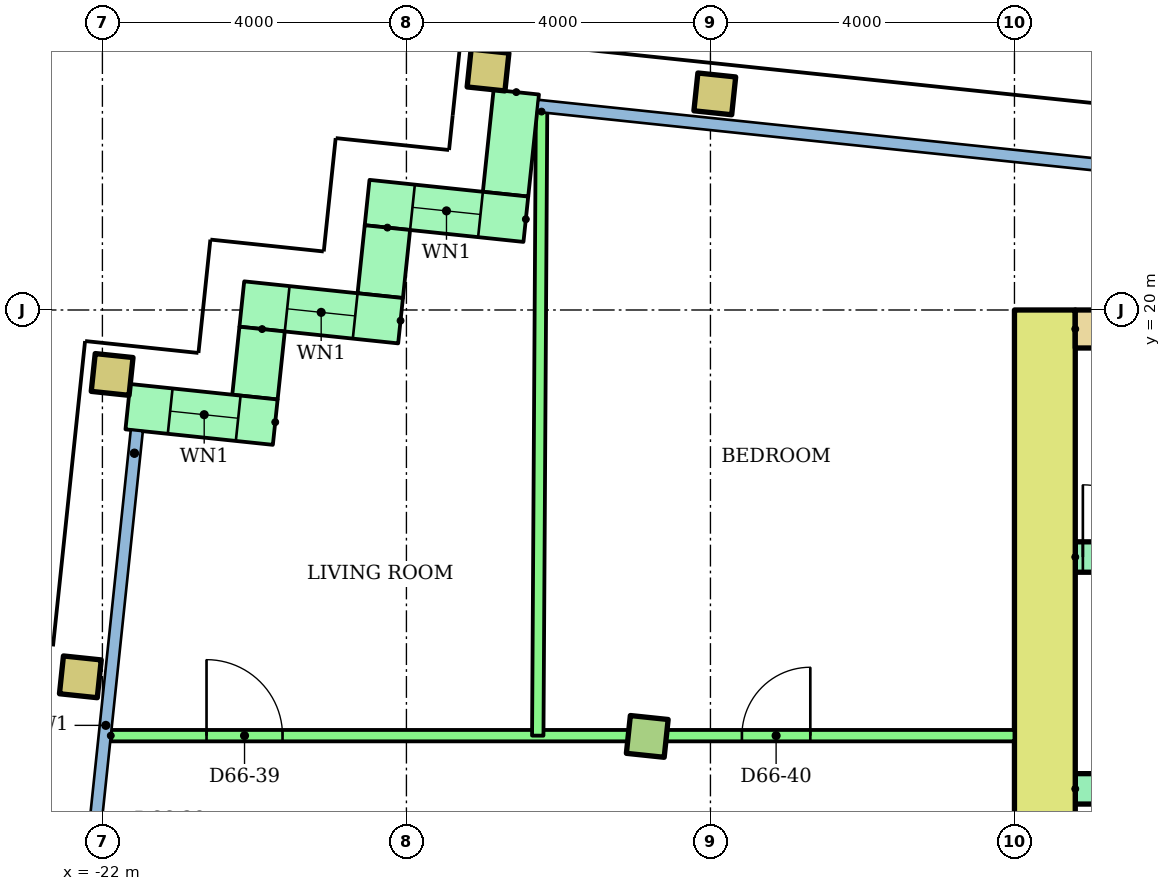
"""IFC4 building model, lengths in metres.
Left out: names, types, materials, properties, quantities, classifications, styles, units other than length and angle.
Written with IfcOpenShell. Run it as: python <this file> out.ifc"""

import sys

from ifc_helpers import new_model, si_unit, direction, frame, frame_2d, origin, origin_2d, place, context, subcontext, project, spatial, rectangle, hollow_rectangle, extrude, element, fill, save


model = new_model("IFC4")
c1 = context("Model", 3, precision=1e-05, world=origin(), true_north=direction((0.0, 1.0)))
c2 = subcontext(c1, "Body", "Model", "MODEL_VIEW")
j1 = project(units=[si_unit("LENGTHUNIT", "METRE"), si_unit("PLANEANGLEUNIT", "RADIAN")], contexts=[c1])
p1 = place(None, origin())
s1 = spatial("IfcSite", under=j1, at=p1, CompositionType="ELEMENT")
p2 = place(p1, origin())
s2 = spatial("IfcBuilding", under=s1, at=p2, CompositionType="ELEMENT")
p3 = place(p2, frame((0.0, 0.0, 256.3)))
s3 = spatial("IfcBuildingStorey", under=s2, at=p3, CompositionType="ELEMENT", Elevation=256.3)
p4 = place(p3, frame((-22.29, 15.174, 0.0), z_axis=(0.0, 0.0, 1.0), x_axis=(0.994521895368, -0.104528463268, 0.0)))
e1 = element("IfcColumn", 1, at=p4, inside=s3, PredefinedType="COLUMN", context=c2, shape_type="SweptSolid", body=[
    extrude(hollow_rectangle(XDim=0.5, YDim=0.5, WallThickness=0.025, at=origin_2d()), origin(), (0.0, 0.0, 1.0), 3.2),
])
p5 = place(p3, frame((-14.831, 14.39, 0.0), z_axis=(0.0, 0.0, 1.0), x_axis=(0.994521895368, -0.104528463268, 0.0)))
e2 = element("IfcColumn", 2, at=p5, inside=s3, PredefinedType="COLUMN", context=c2, shape_type="SweptSolid", body=[
    extrude(rectangle(XDim=0.5, YDim=0.5, at=origin_2d()), origin(), (0.0, 0.0, 1.0), 3.2),
])
for number, where, z_axis, x_axis in (
    (3, (-21.872, 19.152, 0.0), (0.0, 0.0, 1.0), (0.995, -0.105, 0.0)),
    (4, (-16.926, 23.157, 0.0), (0.0, 0.0, 1.0), (0.995, -0.105, 0.0)),
    (5, (-13.943, 22.843, 0.0), (0.0, 0.0, 1.0), (0.995, -0.105, 0.0)),
):
    element("IfcColumn", number, at=place(p3, frame(where, z_axis=z_axis, x_axis=x_axis)), inside=s3, PredefinedType="COLUMN", context=c2, shape_type="SweptSolid", body=[
        extrude(hollow_rectangle(XDim=0.5, YDim=0.5, WallThickness=0.025, at=origin_2d()), origin(), (0.0, 0.0, 1.0), 3.2),
    ])
p6 = place(p3, frame((-16.555, 22.866, 0.0), z_axis=(0.0, 0.0, 1.0), x_axis=(-0.104515354875, -0.994523273029, 0.0)))
e6 = element("IfcWall", 6, at=p6, inside=s3, PredefinedType="STANDARD", context=c2, shape_type="SweptSolid", body=[
    extrude(rectangle(XDim=1.35, YDim=0.6, at=frame_2d((0.675, 0.0))), origin(), (0.0, 0.0, 1.0), 2.92),
])
p7 = place(p3, frame((-16.429, 21.194, 0.0), z_axis=(0.0, 0.0, 1.0), x_axis=(-0.994522640205, 0.104521376379, 0.0)))
e7 = element("IfcWall", 7, at=p7, inside=s3, PredefinedType="STANDARD", context=c2, shape_type="SweptSolid", body=[
    extrude(rectangle(XDim=2.1, YDim=0.6, at=frame_2d((1.05, 0.0))), origin(), (0.0, 0.0, 1.0), 2.92),
])
p8 = place(p7, frame((0.6, 0.0, 0.9)))
e8 = element("IfcOpeningElement", 8, at=p8, cuts=e7, PredefinedType="OPENING", context=c2, shape_type="SweptSolid", body=[
    extrude(rectangle(XDim=0.9, YDim=1.5, at=frame_2d((0.45, 0.75))), frame((0.0, 0.31, 0.0), z_axis=(0.0, -1.0, 0.0), x_axis=(1.0, 0.0, 0.0)), (0.0, 0.0, 1.0), 0.62),
])
p9 = place(p3, frame((-18.25, 21.084, 0.0), z_axis=(0.0, 0.0, 1.0), x_axis=(-0.104416541099, -0.994533652495, 0.0)))
e9 = element("IfcWall", 9, at=p9, inside=s3, PredefinedType="STANDARD", context=c2, shape_type="SweptSolid", body=[
    extrude(rectangle(XDim=0.9, YDim=0.6, at=frame_2d((0.45, 0.0))), origin(), (0.0, 0.0, 1.0), 2.92),
])
p10 = place(p3, frame((-18.077, 19.859, 0.0), z_axis=(0.0, 0.0, 1.0), x_axis=(-0.994522640205, 0.104521376379, 0.0)))
e10 = element("IfcWall", 10, at=p10, inside=s3, PredefinedType="STANDARD", context=c2, shape_type="SweptSolid", body=[
    extrude(rectangle(XDim=2.1, YDim=0.6, at=frame_2d((1.05, 0.0))), origin(), (0.0, 0.0, 1.0), 2.92),
])
p11 = place(p10, frame((0.6, 0.0, 0.9)))
e11 = element("IfcOpeningElement", 11, at=p11, cuts=e10, PredefinedType="OPENING", context=c2, shape_type="SweptSolid", body=[
    extrude(rectangle(XDim=0.9, YDim=1.5, at=frame_2d((0.45, 0.75))), frame((0.0, 0.31, 0.0), z_axis=(0.0, -1.0, 0.0), x_axis=(1.0, 0.0, 0.0)), (0.0, 0.0, 1.0), 0.62),
])
p12 = place(p3, frame((-19.899, 19.749, 0.0), z_axis=(0.0, 0.0, 1.0), x_axis=(-0.104741284723, -0.994499503909, 0.0)))
e12 = element("IfcWall", 12, at=p12, inside=s3, PredefinedType="STANDARD", context=c2, shape_type="SweptSolid", body=[
    extrude(rectangle(XDim=0.9, YDim=0.6, at=frame_2d((0.45, 0.0))), origin(), (0.0, 0.0, 1.0), 2.92),
])
p13 = place(p3, frame((-19.726, 18.524, 0.0), z_axis=(0.0, 0.0, 1.0), x_axis=(-0.994534226826, 0.104411070641, 0.0)))
e13 = element("IfcWall", 13, at=p13, inside=s3, PredefinedType="STANDARD", context=c2, shape_type="SweptSolid", body=[
    extrude(rectangle(XDim=1.95, YDim=0.6, at=frame_2d((0.975, 0.0))), origin(), (0.0, 0.0, 1.0), 2.92),
])
p14 = place(p13, frame((0.49, 0.0, 0.9)))
e14 = element("IfcOpeningElement", 14, at=p14, cuts=e13, PredefinedType="OPENING", context=c2, shape_type="SweptSolid", body=[
    extrude(rectangle(XDim=0.9, YDim=1.5, at=frame_2d((0.45, 0.75))), frame((0.0, 0.31, 0.0), z_axis=(0.0, -1.0, 0.0), x_axis=(1.0, 0.0, 0.0)), (0.0, 0.0, 1.0), 0.62),
])
p15 = place(p3, frame((-9.6, 6.4, 0.0), z_axis=(0.0, 0.0, 1.0), x_axis=(0.0, 1.0, 0.0)))
e15 = element("IfcWall", 15, at=p15, inside=s3, PredefinedType="SHEAR", context=c2, shape_type="SweptSolid", body=[
    extrude(rectangle(XDim=13.6, YDim=0.8, at=frame_2d((6.8, 0.0))), origin(), (0.0, 0.0, 1.0), 2.92),
])
p16 = place(p3, frame((-9.2, 19.75, 0.0)))
e16 = element("IfcWall", 16, at=p16, inside=s3, PredefinedType="SHEAR", context=c2, shape_type="SweptSolid", body=[
    extrude(rectangle(XDim=18.4, YDim=0.5, at=frame_2d((9.2, 0.0))), origin(), (0.0, 0.0, 1.0), 2.92),
])
p17 = place(p3, frame((-9.2, 13.7, 0.0)))
e17 = element("IfcWall", 17, at=p17, inside=s3, PredefinedType="SHEAR", context=c2, shape_type="SweptSolid", body=[
    extrude(rectangle(XDim=8.0, YDim=0.4, at=frame_2d((4.0, 0.0))), origin(), (0.0, 0.0, 1.0), 2.92),
])
p18 = place(p3, frame((-9.2, 16.75, 0.0)))
e18 = element("IfcWall", 18, at=p18, inside=s3, PredefinedType="SHEAR", context=c2, shape_type="SweptSolid", body=[
    extrude(rectangle(XDim=18.4, YDim=0.4, at=frame_2d((9.2, 0.0))), origin(), (0.0, 0.0, 1.0), 2.92),
])
p19 = place(p18, frame((0.1, 0.0, 0.0)))
e19 = element("IfcOpeningElement", 19, at=p19, cuts=e18, PredefinedType="OPENING", context=c2, shape_type="SweptSolid", body=[
    extrude(rectangle(XDim=0.95, YDim=2.1, at=frame_2d((0.475, 1.05))), frame((0.0, 0.21, 0.0), z_axis=(0.0, -1.0, 0.0), x_axis=(1.0, 0.0, 0.0)), (0.0, 0.0, 1.0), 0.42),
])
p20 = place(p18, frame((6.1, 0.0, 0.0)))
e20 = element("IfcOpeningElement", 20, at=p20, cuts=e18, PredefinedType="OPENING", context=c2, shape_type="SweptSolid", body=[
    extrude(rectangle(XDim=0.95, YDim=2.1, at=frame_2d((0.475, 1.05))), frame((0.0, 0.21, 0.0), z_axis=(0.0, -1.0, 0.0), x_axis=(1.0, 0.0, 0.0)), (0.0, 0.0, 1.0), 0.42),
])
p21 = place(p18, frame((12.1, 0.0, 0.0)))
e21 = element("IfcOpeningElement", 21, at=p21, cuts=e18, PredefinedType="OPENING", context=c2, shape_type="SweptSolid", body=[
    extrude(rectangle(XDim=0.95, YDim=2.1, at=frame_2d((0.475, 1.05))), frame((0.0, 0.21, 0.0), z_axis=(0.0, -1.0, 0.0), x_axis=(1.0, 0.0, 0.0)), (0.0, 0.0, 1.0), 0.42),
])
p22 = place(p3, frame((-21.89, 14.4, 0.0)))
e22 = element("IfcWall", 22, at=p22, inside=s3, PredefinedType="PARTITIONING", context=c2, shape_type="SweptSolid", body=[
    extrude(rectangle(XDim=11.89, YDim=0.15, at=frame_2d((5.945, 0.0))), origin(), (0.0, 0.0, 1.0), 2.4),
])
p23 = place(p22, frame((1.26, 0.0, 0.0)))
e23 = element("IfcOpeningElement", 23, at=p23, cuts=e22, PredefinedType="OPENING", context=c2, shape_type="SweptSolid", body=[
    extrude(rectangle(XDim=1.0, YDim=2.1, at=frame_2d((0.5, 1.05))), frame((0.0, 0.085, 0.0), z_axis=(0.0, -1.0, 0.0), x_axis=(1.0, 0.0, 0.0)), (0.0, 0.0, 1.0), 0.17),
])
p24 = place(p22, frame((8.304, 0.0, 0.0)))
e24 = element("IfcOpeningElement", 24, at=p24, cuts=e22, PredefinedType="OPENING", context=c2, shape_type="SweptSolid", body=[
    extrude(rectangle(XDim=0.9, YDim=2.1, at=frame_2d((0.45, 1.05))), frame((0.0, 0.085, 0.0), z_axis=(0.0, -1.0, 0.0), x_axis=(1.0, 0.0, 0.0)), (0.0, 0.0, 1.0), 0.17),
])
p25 = place(p3, frame((-16.222, 22.61, 0.0), z_axis=(0.0, 0.0, 1.0), x_axis=(-0.006095634594, -0.999981421447, 0.0)))
e25 = element("IfcWall", 25, at=p25, inside=s3, PredefinedType="PARTITIONING", context=c2, shape_type="SweptSolid", body=[
    extrude(rectangle(XDim=8.211, YDim=0.15, at=frame_2d((4.105, 0.0))), origin(), (0.0, 0.0, 1.0), 2.4),
])
p26 = place(p8, origin())
e26 = element("IfcWindow", 26, at=p26, inside=s3, PartitioningType="SINGLE_PANEL", PredefinedType="WINDOW", context=c2, shape_type="SweptSolid", body=[
    extrude(rectangle(XDim=0.9, YDim=1.5, at=frame_2d((0.45, 0.75))), frame((0.0, 0.03, 0.0), z_axis=(0.0, -1.0, 0.0), x_axis=(1.0, 0.0, 0.0)), (0.0, 0.0, 1.0), 0.06),
])
fill(e8, e26)
p27 = place(p11, origin())
e27 = element("IfcWindow", 27, at=p27, inside=s3, PartitioningType="SINGLE_PANEL", PredefinedType="WINDOW", context=c2, shape_type="SweptSolid", body=[
    extrude(rectangle(XDim=0.9, YDim=1.5, at=frame_2d((0.45, 0.75))), frame((0.0, 0.03, 0.0), z_axis=(0.0, -1.0, 0.0), x_axis=(1.0, 0.0, 0.0)), (0.0, 0.0, 1.0), 0.06),
])
fill(e11, e27)
p28 = place(p14, origin())
e28 = element("IfcWindow", 28, at=p28, inside=s3, PartitioningType="SINGLE_PANEL", PredefinedType="WINDOW", context=c2, shape_type="SweptSolid", body=[
    extrude(rectangle(XDim=0.9, YDim=1.5, at=frame_2d((0.45, 0.75))), frame((0.0, 0.03, 0.0), z_axis=(0.0, -1.0, 0.0), x_axis=(1.0, 0.0, 0.0)), (0.0, 0.0, 1.0), 0.06),
])
fill(e14, e28)
p29 = place(p19, origin())
e29 = element("IfcDoor", 29, at=p29, inside=s3, OperationType="SINGLE_SWING_LEFT", PredefinedType="DOOR", context=c2, shape_type="SweptSolid", body=[
    extrude(rectangle(XDim=0.95, YDim=2.1, at=frame_2d((0.475, 1.05))), frame((0.0, 0.025, 0.0), z_axis=(0.0, -1.0, 0.0), x_axis=(1.0, 0.0, 0.0)), (0.0, 0.0, 1.0), 0.05),
])
fill(e19, e29)
p30 = place(p23, origin())
e30 = element("IfcDoor", 30, at=p30, inside=s3, OperationType="SINGLE_SWING_LEFT", PredefinedType="DOOR", context=c2, shape_type="SweptSolid", body=[
    extrude(rectangle(XDim=1.0, YDim=2.1, at=frame_2d((0.5, 1.05))), frame((0.0, 0.025, 0.0), z_axis=(0.0, -1.0, 0.0), x_axis=(1.0, 0.0, 0.0)), (0.0, 0.0, 1.0), 0.05),
])
fill(e23, e30)
p31 = place(p24, origin())
e31 = element("IfcDoor", 31, at=p31, inside=s3, OperationType="SINGLE_SWING_RIGHT", PredefinedType="DOOR", context=c2, shape_type="SweptSolid", body=[
    extrude(rectangle(XDim=0.9, YDim=2.1, at=frame_2d((0.45, 1.05))), frame((0.0, 0.025, 0.0), z_axis=(0.0, -1.0, 0.0), x_axis=(1.0, 0.0, 0.0)), (0.0, 0.0, 1.0), 0.05),
])
fill(e24, e31)
save(model, sys.argv[1])
